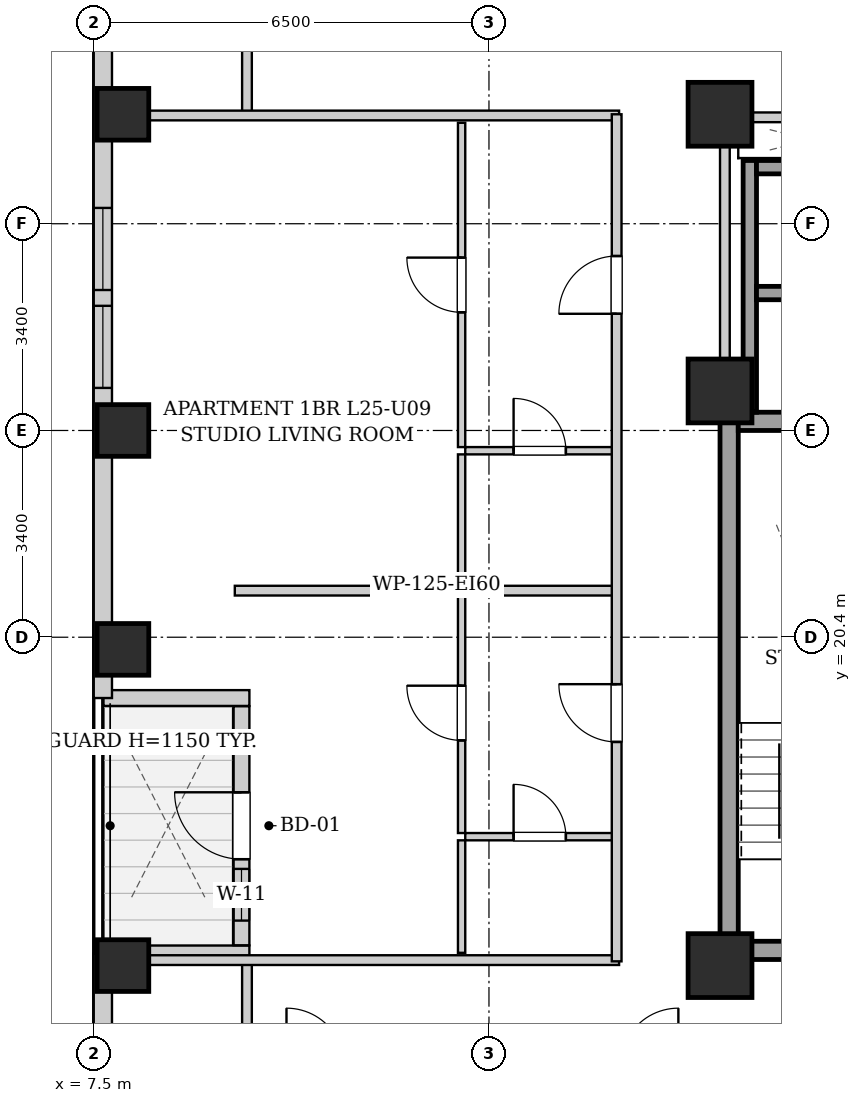
"""IFC4 building model, lengths in metres.
Left out: names, types, materials, properties, quantities, classifications, styles, units other than length and angle.
Written with IfcOpenShell. Run it as: python <this file> out.ifc"""

import sys

from ifc_helpers import new_model, si_unit, direction, frame, frame_2d, origin, origin_2d, place, context, subcontext, project, spatial, rectangle, extrude, element, fill, save


model = new_model("IFC4")
c1 = context("Model", 3, precision=1e-05, world=origin(), true_north=direction((0.0, 1.0)))
c2 = subcontext(c1, "Body", "Model", "MODEL_VIEW")
j1 = project(units=[si_unit("LENGTHUNIT", "METRE"), si_unit("PLANEANGLEUNIT", "RADIAN")], contexts=[c1])
p1 = place(None, origin())
s1 = spatial("IfcSite", under=j1, at=p1, CompositionType="ELEMENT")
p2 = place(p1, origin())
s2 = spatial("IfcBuilding", under=s1, at=p2, CompositionType="ELEMENT")
p3 = place(p2, frame((0.0, 0.0, 91.1)))
s3 = spatial("IfcBuildingStorey", under=s2, at=p3, CompositionType="ELEMENT", Elevation=91.1)
for number, where, z_axis, x_axis in (
    (1, (7.98, 15.0, 0.0), (0.0, 0.0, 1.0), (1.0, 0.0, 0.0)),
    (2, (7.98, 20.2, 0.0), (0.0, 0.0, 1.0), (1.0, 0.0, 0.0)),
    (3, (7.98, 23.8, 0.0), (0.0, 0.0, 1.0), (1.0, 0.0, 0.0)),
    (4, (7.98, 29.0, 0.0), (0.0, 0.0, 1.0), (1.0, 0.0, 0.0)),
):
    element("IfcColumn", number, at=place(p3, frame(where, z_axis=z_axis, x_axis=x_axis)), inside=s3, PredefinedType="COLUMN", context=c2, shape_type="SweptSolid", body=[
        extrude(rectangle(XDim=0.85, YDim=0.85, at=origin_2d()), origin(), (0.0, 0.0, 1.0), 3.2),
    ])
for number, where, z_axis, x_axis in (
    (5, (17.8, 15.0, 0.0), (0.0, 0.0, 1.0), (1.0, 0.0, 0.0)),
    (6, (17.8, 29.0, 0.0), (0.0, 0.0, 1.0), (1.0, 0.0, 0.0)),
    (7, (17.8, 24.45, 0.0), (0.0, 0.0, 1.0), (1.0, 0.0, 0.0)),
):
    element("IfcColumn", number, at=place(p3, frame(where, z_axis=z_axis, x_axis=x_axis)), inside=s3, PredefinedType="COLUMN", context=c2, shape_type="SweptSolid", body=[
        extrude(rectangle(XDim=1.05, YDim=1.05, at=origin_2d()), origin(), (0.0, 0.0, 1.0), 3.2),
    ])
p4 = place(p3, frame((7.65, 2.5, 0.0), z_axis=(0.0, 0.0, 1.0), x_axis=(0.0, 1.0, 0.0)))
e8 = element("IfcWall", 8, at=p4, inside=s3, PredefinedType="SOLIDWALL", context=c2, shape_type="SweptSolid", body=[
    extrude(rectangle(XDim=12.7, YDim=0.3, at=frame_2d((6.35, 0.0))), origin(), (0.0, 0.0, 1.0), 2.94),
])
p5 = place(p4, frame((3.482, 0.0, 0.55)))
e9 = element("IfcOpeningElement", 9, at=p5, cuts=e8, PredefinedType="OPENING", context=c2, shape_type="SweptSolid", body=[
    extrude(rectangle(XDim=1.35, YDim=1.2, at=frame_2d((0.675, 0.6))), frame((0.0, 0.16, 0.0), z_axis=(0.0, -1.0, 0.0), x_axis=(1.0, 0.0, 0.0)), (0.0, 0.0, 1.0), 0.32),
])
p6 = place(p4, frame((1.135, 0.0, 0.55)))
e10 = element("IfcOpeningElement", 10, at=p6, cuts=e8, PredefinedType="OPENING", context=c2, shape_type="SweptSolid", body=[
    extrude(rectangle(XDim=1.35, YDim=1.2, at=frame_2d((0.675, 0.6))), frame((0.0, 0.16, 0.0), z_axis=(0.0, -1.0, 0.0), x_axis=(1.0, 0.0, 0.0)), (0.0, 0.0, 1.0), 0.32),
])
p7 = place(p3, frame((7.66, 15.2, 0.0), z_axis=(0.0, 0.0, 1.0), x_axis=(1.0, 0.0, 0.0)))
e11 = element("IfcWall", 11, at=p7, inside=s3, PredefinedType="SOLIDWALL", context=c2, shape_type="SweptSolid", body=[
    extrude(rectangle(XDim=2.4, YDim=0.26, at=frame_2d((1.2, 0.0))), origin(), (0.0, 0.0, 1.0), 2.94),
])
p8 = place(p3, frame((9.93, 15.334, 0.0), z_axis=(0.0, 0.0, 1.0), x_axis=(0.0, 1.0, 0.0)))
e12 = element("IfcWall", 12, at=p8, inside=s3, PredefinedType="SOLIDWALL", context=c2, shape_type="SweptSolid", body=[
    extrude(rectangle(XDim=3.932, YDim=0.26, at=frame_2d((1.966, 0.0))), origin(), (0.0, 0.0, 1.0), 2.94),
])
p9 = place(p8, frame((1.416, 0.0, 0.0)))
e13 = element("IfcOpeningElement", 13, at=p9, cuts=e12, PredefinedType="OPENING", context=c2, shape_type="SweptSolid", body=[
    extrude(rectangle(XDim=1.1, YDim=2.0, at=frame_2d((0.55, 1.0))), frame((0.0, 0.14, 0.0), z_axis=(0.0, -1.0, 0.0), x_axis=(1.0, 0.0, 0.0)), (0.0, 0.0, 1.0), 0.28),
])
p10 = place(p8, frame((0.406, 0.0, 0.55)))
e14 = element("IfcOpeningElement", 14, at=p10, cuts=e12, PredefinedType="OPENING", context=c2, shape_type="SweptSolid", body=[
    extrude(rectangle(XDim=0.85, YDim=1.2, at=frame_2d((0.425, 0.6))), frame((0.0, 0.14, 0.0), z_axis=(0.0, -1.0, 0.0), x_axis=(1.0, 0.0, 0.0)), (0.0, 0.0, 1.0), 0.28),
])
p11 = place(p3, frame((10.06, 19.4, 0.0), z_axis=(0.0, 0.0, 1.0), x_axis=(-1.0, 0.0, 0.0)))
e15 = element("IfcWall", 15, at=p11, inside=s3, PredefinedType="SOLIDWALL", context=c2, shape_type="SweptSolid", body=[
    extrude(rectangle(XDim=2.4, YDim=0.26, at=frame_2d((1.2, 0.0))), origin(), (0.0, 0.0, 1.0), 2.94),
])
p12 = place(p3, frame((7.65, 19.4, 0.0), z_axis=(0.0, 0.0, 1.0), x_axis=(0.0, 1.0, 0.0)))
e16 = element("IfcWall", 16, at=p12, inside=s3, PredefinedType="SOLIDWALL", context=c2, shape_type="SweptSolid", body=[
    extrude(rectangle(XDim=21.4, YDim=0.3, at=frame_2d((10.7, 0.0))), origin(), (0.0, 0.0, 1.0), 2.94),
])
p13 = place(p12, frame((16.957, 0.0, 0.55)))
e17 = element("IfcOpeningElement", 17, at=p13, cuts=e16, PredefinedType="OPENING", context=c2, shape_type="SweptSolid", body=[
    extrude(rectangle(XDim=1.35, YDim=1.2, at=frame_2d((0.675, 0.6))), frame((0.0, 0.16, 0.0), z_axis=(0.0, -1.0, 0.0), x_axis=(1.0, 0.0, 0.0)), (0.0, 0.0, 1.0), 0.32),
])
p14 = place(p12, frame((15.185, 0.0, 0.55)))
e18 = element("IfcOpeningElement", 18, at=p14, cuts=e16, PredefinedType="OPENING", context=c2, shape_type="SweptSolid", body=[
    extrude(rectangle(XDim=1.35, YDim=1.2, at=frame_2d((0.675, 0.6))), frame((0.0, 0.16, 0.0), z_axis=(0.0, -1.0, 0.0), x_axis=(1.0, 0.0, 0.0)), (0.0, 0.0, 1.0), 0.32),
])
p15 = place(p12, frame((5.1, 0.0, 0.55)))
e19 = element("IfcOpeningElement", 19, at=p15, cuts=e16, PredefinedType="OPENING", context=c2, shape_type="SweptSolid", body=[
    extrude(rectangle(XDim=1.35, YDim=1.2, at=frame_2d((0.675, 0.6))), frame((0.0, 0.16, 0.0), z_axis=(0.0, -1.0, 0.0), x_axis=(1.0, 0.0, 0.0)), (0.0, 0.0, 1.0), 0.32),
])
p16 = place(p12, frame((6.71, 0.0, 0.55)))
e20 = element("IfcOpeningElement", 20, at=p16, cuts=e16, PredefinedType="OPENING", context=c2, shape_type="SweptSolid", body=[
    extrude(rectangle(XDim=1.35, YDim=1.2, at=frame_2d((0.675, 0.6))), frame((0.0, 0.16, 0.0), z_axis=(0.0, -1.0, 0.0), x_axis=(1.0, 0.0, 0.0)), (0.0, 0.0, 1.0), 0.32),
])
p17 = place(p3, frame((17.95, 15.1, 0.0), z_axis=(0.0, 0.0, 1.0), x_axis=(0.0, 1.0, 0.0)))
e21 = element("IfcWall", 21, at=p17, inside=s3, PredefinedType="SHEAR", context=c2, shape_type="SweptSolid", body=[
    extrude(rectangle(XDim=9.0, YDim=0.3, at=frame_2d((4.5, 0.0))), origin(), (0.0, 0.0, 1.0), 2.94),
])
p18 = place(p3, frame((18.1, 23.95, 0.0), z_axis=(0.0, 0.0, 1.0), x_axis=(1.0, 0.0, 0.0)))
e22 = element("IfcWall", 22, at=p18, inside=s3, PredefinedType="SHEAR", context=c2, shape_type="SweptSolid", body=[
    extrude(rectangle(XDim=2.85, YDim=0.3, at=frame_2d((1.425, 0.0))), origin(), (0.0, 0.0, 1.0), 2.94),
])
p19 = place(p3, frame((18.1, 15.25, 0.0), z_axis=(0.0, 0.0, 1.0), x_axis=(1.0, 0.0, 0.0)))
e23 = element("IfcWall", 23, at=p19, inside=s3, PredefinedType="SHEAR", context=c2, shape_type="SweptSolid", body=[
    extrude(rectangle(XDim=2.85, YDim=0.3, at=frame_2d((1.425, 0.0))), origin(), (0.0, 0.0, 1.0), 2.94),
])
p20 = place(p19, frame((0.86, 0.0, 0.0)))
e24 = element("IfcOpeningElement", 24, at=p20, cuts=e23, PredefinedType="OPENING", context=c2, shape_type="SweptSolid", body=[
    extrude(rectangle(XDim=1.1, YDim=2.05, at=frame_2d((0.55, 1.025))), frame((0.0, 0.16, 0.0), z_axis=(0.0, -1.0, 0.0), x_axis=(1.0, 0.0, 0.0)), (0.0, 0.0, 1.0), 0.32),
])
p21 = place(p3, frame((18.29, 24.1, 0.0), z_axis=(0.0, 0.0, 1.0), x_axis=(0.0, 1.0, 0.0)))
e25 = element("IfcWall", 25, at=p21, inside=s3, PredefinedType="SHEAR", context=c2, shape_type="SweptSolid", body=[
    extrude(rectangle(XDim=4.14, YDim=0.22, at=frame_2d((2.07, 0.0))), origin(), (0.0, 0.0, 1.0), 2.94),
])
for number, where, z_axis, x_axis in (
    (26, (18.4, 26.06, 0.0), (0.0, 0.0, 1.0), (1.0, 0.0, 0.0)),
    (27, (18.4, 28.13, 0.0), (0.0, 0.0, 1.0), (1.0, 0.0, 0.0)),
):
    element("IfcWall", number, at=place(p3, frame(where, z_axis=z_axis, x_axis=x_axis)), inside=s3, PredefinedType="SHEAR", context=c2, shape_type="SweptSolid", body=[
        extrude(rectangle(XDim=1.9, YDim=0.22, at=frame_2d((0.95, 0.0))), origin(), (0.0, 0.0, 1.0), 2.94),
    ])
p22 = place(p3, frame((17.88, 24.12, 0.0), z_axis=(0.0, 0.0, 1.0), x_axis=(0.0, 1.0, 0.0)))
e28 = element("IfcWall", 28, at=p22, inside=s3, PredefinedType="PARTITIONING", context=c2, shape_type="SweptSolid", body=[
    extrude(rectangle(XDim=4.76, YDim=0.16, at=frame_2d((2.38, 0.0))), origin(), (0.0, 0.0, 1.0), 2.94),
])
p23 = place(p3, frame((17.96, 28.95, 0.0), z_axis=(0.0, 0.0, 1.0), x_axis=(1.0, 0.0, 0.0)))
e29 = element("IfcWall", 29, at=p23, inside=s3, PredefinedType="PARTITIONING", context=c2, shape_type="SweptSolid", body=[
    extrude(rectangle(XDim=4.29, YDim=0.16, at=frame_2d((2.145, 0.0))), origin(), (0.0, 0.0, 1.0), 2.309),
])
p24 = place(p23, frame((1.645, 0.0, 0.0)))
e30 = element("IfcOpeningElement", 30, at=p24, cuts=e29, PredefinedType="OPENING", context=c2, shape_type="SweptSolid", body=[
    extrude(rectangle(XDim=0.86, YDim=2.05, at=frame_2d((0.43, 1.025))), frame((0.0, 0.09, 0.0), z_axis=(0.0, -1.0, 0.0), x_axis=(1.0, 0.0, 0.0)), (0.0, 0.0, 1.0), 0.18),
])
for number, where, z_axis, x_axis in (
    (31, (10.02, 13.35, 0.0), (0.0, 0.0, 1.0), (0.0, 1.0, 0.0)),
    (32, (10.02, 28.98, 0.0), (0.0, 0.0, 1.0), (0.0, 1.0, 0.0)),
):
    element("IfcWall", number, at=place(p3, frame(where, z_axis=z_axis, x_axis=x_axis)), inside=s3, PredefinedType="PARTITIONING", context=c2, shape_type="SweptSolid", body=[
        extrude(rectangle(XDim=1.74, YDim=0.16, at=frame_2d((0.87, 0.0))), origin(), (0.0, 0.0, 1.0), 2.94),
    ])
for number, where, z_axis, x_axis in (
    (33, (7.78, 15.09, 0.0), (0.0, 0.0, 1.0), (1.0, 0.0, 0.0)),
    (34, (7.78, 28.98, 0.0), (0.0, 0.0, 1.0), (1.0, 0.0, 0.0)),
):
    element("IfcWall", number, at=place(p3, frame(where, z_axis=z_axis, x_axis=x_axis)), inside=s3, PredefinedType="PARTITIONING", context=c2, shape_type="SweptSolid", body=[
        extrude(rectangle(XDim=8.36, YDim=0.16, at=frame_2d((4.18, 0.0))), origin(), (0.0, 0.0, 1.0), 2.309),
    ])
p25 = place(p3, frame((9.82, 21.166, 0.0), z_axis=(0.0, 0.0, 1.0), x_axis=(1.0, 0.0, 0.0)))
e35 = element("IfcWall", 35, at=p25, inside=s3, PredefinedType="PARTITIONING", context=c2, shape_type="SweptSolid", body=[
    extrude(rectangle(XDim=6.24, YDim=0.16, at=frame_2d((3.12, 0.0))), origin(), (0.0, 0.0, 1.0), 2.94),
])
p26 = place(p3, frame((13.61, 17.12, 0.0), z_axis=(0.0, 0.0, 1.0), x_axis=(1.0, 0.0, 0.0)))
e36 = element("IfcWall", 36, at=p26, inside=s3, PredefinedType="PARTITIONING", context=c2, shape_type="SweptSolid", body=[
    extrude(rectangle(XDim=2.45, YDim=0.12, at=frame_2d((1.225, 0.0))), origin(), (0.0, 0.0, 1.0), 2.94),
])
p27 = place(p26, frame((0.795, 0.0, 0.0)))
e37 = element("IfcOpeningElement", 37, at=p27, cuts=e36, PredefinedType="OPENING", context=c2, shape_type="SweptSolid", body=[
    extrude(rectangle(XDim=0.86, YDim=2.05, at=frame_2d((0.43, 1.025))), frame((0.0, 0.07, 0.0), z_axis=(0.0, -1.0, 0.0), x_axis=(1.0, 0.0, 0.0)), (0.0, 0.0, 1.0), 0.14),
])
p28 = place(p3, frame((13.55, 15.21, 0.0), z_axis=(0.0, 0.0, 1.0), x_axis=(0.0, 1.0, 0.0)))
e38 = element("IfcWall", 38, at=p28, inside=s3, PredefinedType="PARTITIONING", context=c2, shape_type="SweptSolid", body=[
    extrude(rectangle(XDim=1.85, YDim=0.12, at=frame_2d((0.925, 0.0))), origin(), (0.0, 0.0, 1.0), 2.94),
])
p29 = place(p3, frame((13.55, 17.18, 0.0), z_axis=(0.0, 0.0, 1.0), x_axis=(0.0, 1.0, 0.0)))
e39 = element("IfcWall", 39, at=p29, inside=s3, PredefinedType="PARTITIONING", context=c2, shape_type="SweptSolid", body=[
    extrude(rectangle(XDim=3.946, YDim=0.12, at=frame_2d((1.973, 0.0))), origin(), (0.0, 0.0, 1.0), 2.94),
])
p30 = place(p29, frame((1.523, 0.0, 0.0)))
e40 = element("IfcOpeningElement", 40, at=p30, cuts=e39, PredefinedType="OPENING", context=c2, shape_type="SweptSolid", body=[
    extrude(rectangle(XDim=0.9, YDim=2.05, at=frame_2d((0.45, 1.025))), frame((0.0, 0.07, 0.0), z_axis=(0.0, -1.0, 0.0), x_axis=(1.0, 0.0, 0.0)), (0.0, 0.0, 1.0), 0.14),
])
p31 = place(p3, frame((13.61, 23.467, 0.0), z_axis=(0.0, 0.0, 1.0), x_axis=(1.0, 0.0, 0.0)))
e41 = element("IfcWall", 41, at=p31, inside=s3, PredefinedType="PARTITIONING", context=c2, shape_type="SweptSolid", body=[
    extrude(rectangle(XDim=2.45, YDim=0.12, at=frame_2d((1.225, 0.0))), origin(), (0.0, 0.0, 1.0), 2.94),
])
p32 = place(p31, frame((0.795, 0.0, 0.0)))
e42 = element("IfcOpeningElement", 42, at=p32, cuts=e41, PredefinedType="OPENING", context=c2, shape_type="SweptSolid", body=[
    extrude(rectangle(XDim=0.86, YDim=2.05, at=frame_2d((0.43, 1.025))), frame((0.0, 0.07, 0.0), z_axis=(0.0, -1.0, 0.0), x_axis=(1.0, 0.0, 0.0)), (0.0, 0.0, 1.0), 0.14),
])
p33 = place(p3, frame((13.55, 21.286, 0.0), z_axis=(0.0, 0.0, 1.0), x_axis=(0.0, 1.0, 0.0)))
e43 = element("IfcWall", 43, at=p33, inside=s3, PredefinedType="PARTITIONING", context=c2, shape_type="SweptSolid", body=[
    extrude(rectangle(XDim=2.121, YDim=0.12, at=frame_2d((1.061, 0.0))), origin(), (0.0, 0.0, 1.0), 2.94),
])
p34 = place(p3, frame((13.55, 23.527, 0.0), z_axis=(0.0, 0.0, 1.0), x_axis=(0.0, 1.0, 0.0)))
e44 = element("IfcWall", 44, at=p34, inside=s3, PredefinedType="PARTITIONING", context=c2, shape_type="SweptSolid", body=[
    extrude(rectangle(XDim=5.333, YDim=0.12, at=frame_2d((2.667, 0.0))), origin(), (0.0, 0.0, 1.0), 2.94),
])
p35 = place(p34, frame((2.216, 0.0, 0.0)))
e45 = element("IfcOpeningElement", 45, at=p35, cuts=e44, PredefinedType="OPENING", context=c2, shape_type="SweptSolid", body=[
    extrude(rectangle(XDim=0.9, YDim=2.05, at=frame_2d((0.45, 1.025))), frame((0.0, 0.07, 0.0), z_axis=(0.0, -1.0, 0.0), x_axis=(1.0, 0.0, 0.0)), (0.0, 0.0, 1.0), 0.14),
])
p36 = place(p3, frame((16.1, 15.07, 0.0), z_axis=(0.0, 0.0, 1.0), x_axis=(0.0, 1.0, 0.0)))
e46 = element("IfcWall", 46, at=p36, inside=s3, PredefinedType="PARTITIONING", context=c2, shape_type="SweptSolid", body=[
    extrude(rectangle(XDim=13.93, YDim=0.16, at=frame_2d((6.965, 0.0))), origin(), (0.0, 0.0, 1.0), 2.94),
])
p37 = place(p36, frame((3.608, 0.0, 0.0)))
e47 = element("IfcOpeningElement", 47, at=p37, cuts=e46, PredefinedType="OPENING", context=c2, shape_type="SweptSolid", body=[
    extrude(rectangle(XDim=0.95, YDim=2.1, at=frame_2d((0.475, 1.05))), frame((0.0, 0.09, 0.0), z_axis=(0.0, -1.0, 0.0), x_axis=(1.0, 0.0, 0.0)), (0.0, 0.0, 1.0), 0.18),
])
p38 = place(p36, frame((10.649, 0.0, 0.0)))
e48 = element("IfcOpeningElement", 48, at=p38, cuts=e46, PredefinedType="OPENING", context=c2, shape_type="SweptSolid", body=[
    extrude(rectangle(XDim=0.95, YDim=2.1, at=frame_2d((0.475, 1.05))), frame((0.0, 0.09, 0.0), z_axis=(0.0, -1.0, 0.0), x_axis=(1.0, 0.0, 0.0)), (0.0, 0.0, 1.0), 0.18),
])
p39 = place(p27, origin())
e49 = element("IfcDoor", 49, at=p39, inside=s3, OperationType="SINGLE_SWING_LEFT", PredefinedType="DOOR", context=c2, shape_type="SweptSolid", body=[
    extrude(rectangle(XDim=0.86, YDim=2.05, at=frame_2d((0.43, 1.025))), frame((0.0, 0.025, 0.0), z_axis=(0.0, -1.0, 0.0), x_axis=(1.0, 0.0, 0.0)), (0.0, 0.0, 1.0), 0.05),
])
fill(e37, e49)
p40 = place(p30, origin())
e50 = element("IfcDoor", 50, at=p40, inside=s3, OperationType="SINGLE_SWING_RIGHT", PredefinedType="DOOR", context=c2, shape_type="SweptSolid", body=[
    extrude(rectangle(XDim=0.9, YDim=2.05, at=frame_2d((0.45, 1.025))), frame((0.0, 0.025, 0.0), z_axis=(0.0, -1.0, 0.0), x_axis=(1.0, 0.0, 0.0)), (0.0, 0.0, 1.0), 0.05),
])
fill(e40, e50)
p41 = place(p32, origin())
e51 = element("IfcDoor", 51, at=p41, inside=s3, OperationType="SINGLE_SWING_LEFT", PredefinedType="DOOR", context=c2, shape_type="SweptSolid", body=[
    extrude(rectangle(XDim=0.86, YDim=2.05, at=frame_2d((0.43, 1.025))), frame((0.0, 0.025, 0.0), z_axis=(0.0, -1.0, 0.0), x_axis=(1.0, 0.0, 0.0)), (0.0, 0.0, 1.0), 0.05),
])
fill(e42, e51)
p42 = place(p35, origin())
e52 = element("IfcDoor", 52, at=p42, inside=s3, OperationType="SINGLE_SWING_RIGHT", PredefinedType="DOOR", context=c2, shape_type="SweptSolid", body=[
    extrude(rectangle(XDim=0.9, YDim=2.05, at=frame_2d((0.45, 1.025))), frame((0.0, 0.025, 0.0), z_axis=(0.0, -1.0, 0.0), x_axis=(1.0, 0.0, 0.0)), (0.0, 0.0, 1.0), 0.05),
])
fill(e45, e52)
p43 = place(p37, origin())
e53 = element("IfcDoor", 53, at=p43, inside=s3, OperationType="SINGLE_SWING_RIGHT", PredefinedType="DOOR", context=c2, shape_type="SweptSolid", body=[
    extrude(rectangle(XDim=0.95, YDim=2.1, at=frame_2d((0.475, 1.05))), frame((0.0, 0.025, 0.0), z_axis=(0.0, -1.0, 0.0), x_axis=(1.0, 0.0, 0.0)), (0.0, 0.0, 1.0), 0.05),
])
fill(e47, e53)
p44 = place(p38, origin())
e54 = element("IfcDoor", 54, at=p44, inside=s3, OperationType="SINGLE_SWING_LEFT", PredefinedType="DOOR", context=c2, shape_type="SweptSolid", body=[
    extrude(rectangle(XDim=0.95, YDim=2.1, at=frame_2d((0.475, 1.05))), frame((0.0, 0.025, 0.0), z_axis=(0.0, -1.0, 0.0), x_axis=(1.0, 0.0, 0.0)), (0.0, 0.0, 1.0), 0.05),
])
fill(e48, e54)
p45 = place(p9, origin())
e55 = element("IfcDoor", 55, at=p45, inside=s3, OperationType="SINGLE_SWING_RIGHT", PredefinedType="DOOR", context=c2, shape_type="SweptSolid", body=[
    extrude(rectangle(XDim=1.1, YDim=2.0, at=frame_2d((0.55, 1.0))), frame((0.0, 0.025, 0.0), z_axis=(0.0, -1.0, 0.0), x_axis=(1.0, 0.0, 0.0)), (0.0, 0.0, 1.0), 0.05),
])
fill(e13, e55)
p46 = place(p10, origin())
e56 = element("IfcWindow", 56, at=p46, inside=s3, PartitioningType="SINGLE_PANEL", PredefinedType="WINDOW", context=c2, shape_type="SweptSolid", body=[
    extrude(rectangle(XDim=0.85, YDim=1.2, at=frame_2d((0.425, 0.6))), frame((0.0, 0.03, 0.0), z_axis=(0.0, -1.0, 0.0), x_axis=(1.0, 0.0, 0.0)), (0.0, 0.0, 1.0), 0.06),
])
fill(e14, e56)
p47 = place(p15, origin())
e57 = element("IfcWindow", 57, at=p47, inside=s3, PartitioningType="SINGLE_PANEL", PredefinedType="WINDOW", context=c2, shape_type="SweptSolid", body=[
    extrude(rectangle(XDim=1.35, YDim=1.2, at=frame_2d((0.675, 0.6))), frame((0.0, 0.03, 0.0), z_axis=(0.0, -1.0, 0.0), x_axis=(1.0, 0.0, 0.0)), (0.0, 0.0, 1.0), 0.06),
])
fill(e19, e57)
p48 = place(p16, origin())
e58 = element("IfcWindow", 58, at=p48, inside=s3, PartitioningType="SINGLE_PANEL", PredefinedType="WINDOW", context=c2, shape_type="SweptSolid", body=[
    extrude(rectangle(XDim=1.35, YDim=1.2, at=frame_2d((0.675, 0.6))), frame((0.0, 0.03, 0.0), z_axis=(0.0, -1.0, 0.0), x_axis=(1.0, 0.0, 0.0)), (0.0, 0.0, 1.0), 0.06),
])
fill(e20, e58)
save(model, sys.argv[1])
